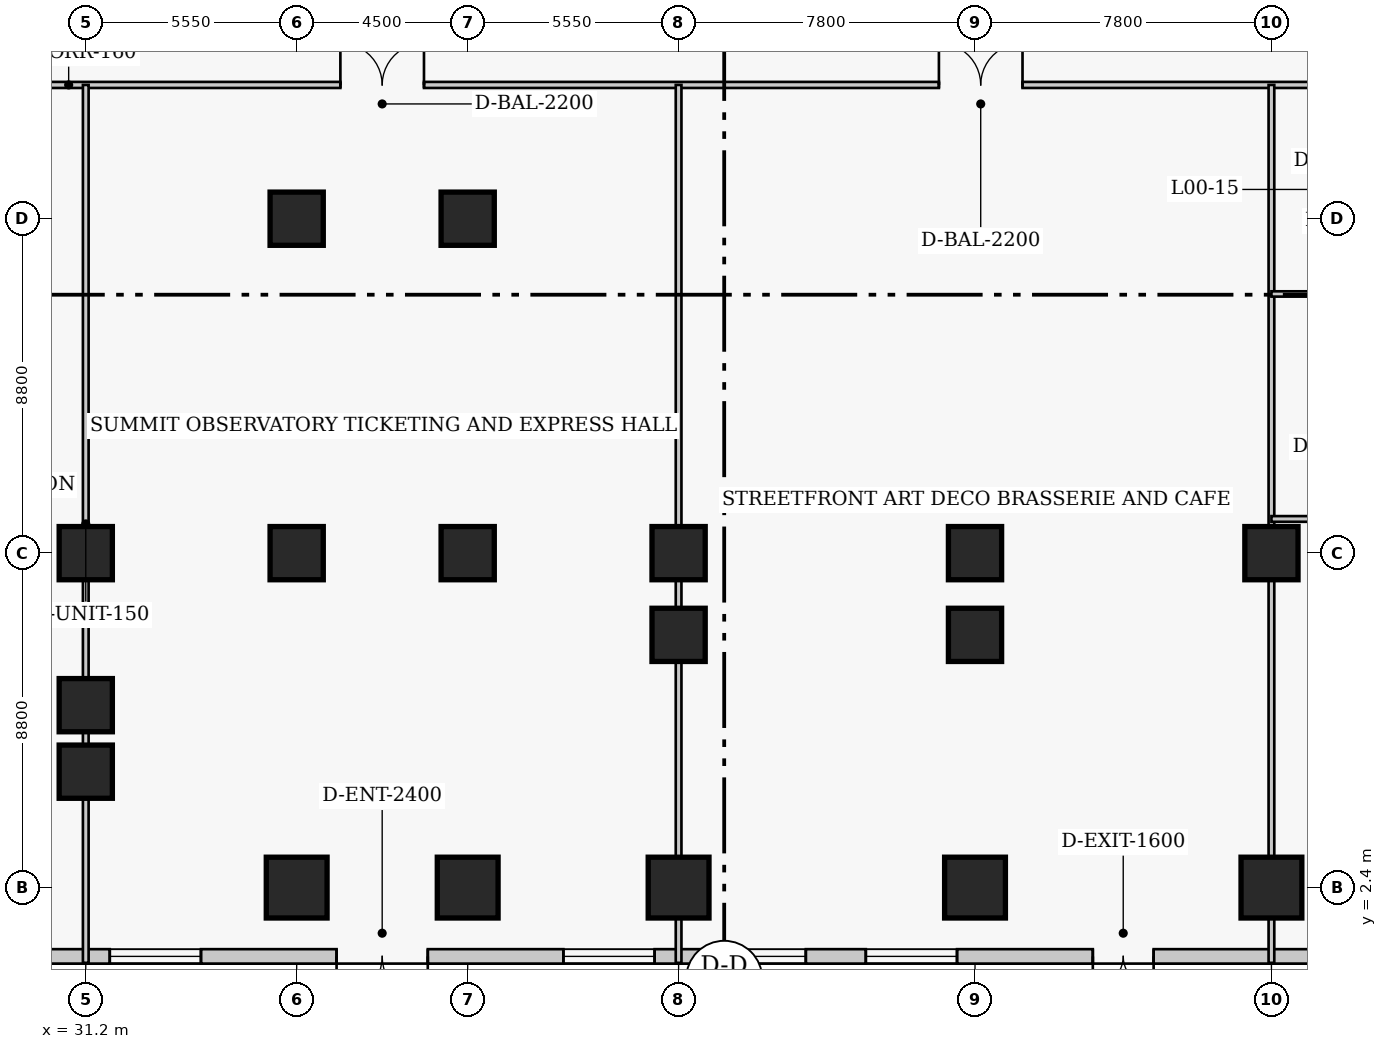
"""IFC4 building model, lengths in metres.
Left out: names, types, materials, properties, quantities, classifications, styles, units other than length and angle.
Written with IfcOpenShell. Run it as: python <this file> out.ifc"""

import sys

from ifc_helpers import new_model, si_unit, direction, frame, frame_2d, origin, origin_2d, place, context, subcontext, project, spatial, rectangle, extrude, element, fill, save


model = new_model("IFC4")
c1 = context("Model", 3, precision=1e-05, world=origin(), true_north=direction((0.0, 1.0)))
c2 = subcontext(c1, "Body", "Model", "MODEL_VIEW")
j1 = project(units=[si_unit("LENGTHUNIT", "METRE"), si_unit("PLANEANGLEUNIT", "RADIAN")], contexts=[c1])
p1 = place(None, origin())
s1 = spatial("IfcSite", under=j1, at=p1, CompositionType="ELEMENT")
p2 = place(p1, origin())
s2 = spatial("IfcBuilding", under=s1, at=p2, CompositionType="ELEMENT")
p3 = place(p2, origin())
s3 = spatial("IfcBuildingStorey", under=s2, at=p3, CompositionType="ELEMENT", Elevation=0.0)
p4 = place(p3, frame((31.2, 11.2, 0.0), z_axis=(0.0, 0.0, 1.0), x_axis=(1.0, 0.0, 0.0)))
e1 = element("IfcColumn", 1, at=p4, inside=s3, PredefinedType="COLUMN", context=c2, shape_type="SweptSolid", body=[
    extrude(rectangle(XDim=1.4, YDim=1.4, at=origin_2d()), origin(), (0.0, 0.0, 1.0), 5.4),
])
p5 = place(p3, frame((36.75, 2.4, 0.0), z_axis=(0.0, 0.0, 1.0), x_axis=(1.0, 0.0, 0.0)))
e2 = element("IfcColumn", 2, at=p5, inside=s3, PredefinedType="COLUMN", context=c2, shape_type="SweptSolid", body=[
    extrude(rectangle(XDim=1.6, YDim=1.6, at=origin_2d()), origin(), (0.0, 0.0, 1.0), 5.4),
])
for number, where, z_axis, x_axis in (
    (3, (36.75, 11.2, 0.0), (0.0, 0.0, 1.0), (1.0, 0.0, 0.0)),
    (4, (36.75, 20.0, 0.0), (0.0, 0.0, 1.0), (1.0, 0.0, 0.0)),
):
    element("IfcColumn", number, at=place(p3, frame(where, z_axis=z_axis, x_axis=x_axis)), inside=s3, PredefinedType="COLUMN", context=c2, shape_type="SweptSolid", body=[
        extrude(rectangle(XDim=1.4, YDim=1.4, at=origin_2d()), origin(), (0.0, 0.0, 1.0), 5.4),
    ])
p6 = place(p3, frame((41.25, 2.4, 0.0), z_axis=(0.0, 0.0, 1.0), x_axis=(1.0, 0.0, 0.0)))
e5 = element("IfcColumn", 5, at=p6, inside=s3, PredefinedType="COLUMN", context=c2, shape_type="SweptSolid", body=[
    extrude(rectangle(XDim=1.6, YDim=1.6, at=origin_2d()), origin(), (0.0, 0.0, 1.0), 5.4),
])
for number, where, z_axis, x_axis in (
    (6, (41.25, 11.2, 0.0), (0.0, 0.0, 1.0), (1.0, 0.0, 0.0)),
    (7, (41.25, 20.0, 0.0), (0.0, 0.0, 1.0), (1.0, 0.0, 0.0)),
):
    element("IfcColumn", number, at=place(p3, frame(where, z_axis=z_axis, x_axis=x_axis)), inside=s3, PredefinedType="COLUMN", context=c2, shape_type="SweptSolid", body=[
        extrude(rectangle(XDim=1.4, YDim=1.4, at=origin_2d()), origin(), (0.0, 0.0, 1.0), 5.4),
    ])
p7 = place(p3, frame((46.8, 2.4, 0.0), z_axis=(0.0, 0.0, 1.0), x_axis=(1.0, 0.0, 0.0)))
e8 = element("IfcColumn", 8, at=p7, inside=s3, PredefinedType="COLUMN", context=c2, shape_type="SweptSolid", body=[
    extrude(rectangle(XDim=1.6, YDim=1.6, at=origin_2d()), origin(), (0.0, 0.0, 1.0), 5.4),
])
p8 = place(p3, frame((46.8, 11.2, 0.0), z_axis=(0.0, 0.0, 1.0), x_axis=(1.0, 0.0, 0.0)))
e9 = element("IfcColumn", 9, at=p8, inside=s3, PredefinedType="COLUMN", context=c2, shape_type="SweptSolid", body=[
    extrude(rectangle(XDim=1.4, YDim=1.4, at=origin_2d()), origin(), (0.0, 0.0, 1.0), 5.4),
])
p9 = place(p3, frame((54.6, 2.4, 0.0), z_axis=(0.0, 0.0, 1.0), x_axis=(1.0, 0.0, 0.0)))
e10 = element("IfcColumn", 10, at=p9, inside=s3, PredefinedType="COLUMN", context=c2, shape_type="SweptSolid", body=[
    extrude(rectangle(XDim=1.6, YDim=1.6, at=origin_2d()), origin(), (0.0, 0.0, 1.0), 5.4),
])
p10 = place(p3, frame((54.6, 11.2, 0.0), z_axis=(0.0, 0.0, 1.0), x_axis=(1.0, 0.0, 0.0)))
e11 = element("IfcColumn", 11, at=p10, inside=s3, PredefinedType="COLUMN", context=c2, shape_type="SweptSolid", body=[
    extrude(rectangle(XDim=1.4, YDim=1.4, at=origin_2d()), origin(), (0.0, 0.0, 1.0), 5.4),
])
p11 = place(p3, frame((62.4, 2.4, 0.0), z_axis=(0.0, 0.0, 1.0), x_axis=(1.0, 0.0, 0.0)))
e12 = element("IfcColumn", 12, at=p11, inside=s3, PredefinedType="COLUMN", context=c2, shape_type="SweptSolid", body=[
    extrude(rectangle(XDim=1.6, YDim=1.6, at=origin_2d()), origin(), (0.0, 0.0, 1.0), 5.4),
])
for number, where, z_axis, x_axis in (
    (13, (62.4, 11.2, 0.0), (0.0, 0.0, 1.0), (1.0, 0.0, 0.0)),
    (14, (31.2, 7.2, 0.0), (0.0, 0.0, 1.0), (1.0, 0.0, 0.0)),
    (15, (31.2, 5.45, 0.0), (0.0, 0.0, 1.0), (1.0, 0.0, 0.0)),
    (16, (46.8, 9.05, 0.0), (0.0, 0.0, 1.0), (1.0, 0.0, 0.0)),
    (17, (54.6, 9.05, 0.0), (0.0, 0.0, 1.0), (1.0, 0.0, 0.0)),
):
    element("IfcColumn", number, at=place(p3, frame(where, z_axis=z_axis, x_axis=x_axis)), inside=s3, PredefinedType="COLUMN", context=c2, shape_type="SweptSolid", body=[
        extrude(rectangle(XDim=1.4, YDim=1.4, at=origin_2d()), origin(), (0.0, 0.0, 1.0), 5.4),
    ])
p12 = place(p3, frame((78.79, 0.59, 0.0), z_axis=(0.0, 0.0, 1.0), x_axis=(-1.0, 0.0, 0.0)))
e18 = element("IfcWall", 18, at=p12, inside=s3, PredefinedType="SOLIDWALL", context=c2, shape_type="SweptSolid", body=[
    extrude(rectangle(XDim=79.58, YDim=0.38, at=frame_2d((39.79, 0.0))), origin(), (0.0, 0.0, 1.0), 5.1),
])
p13 = place(p12, frame((68.44, 0.0, 0.0)))
e19 = element("IfcOpeningElement", 19, at=p13, cuts=e18, PredefinedType="OPENING", context=c2, shape_type="SweptSolid", body=[
    extrude(rectangle(XDim=1.6, YDim=2.2, at=frame_2d((0.8, 1.1))), frame((0.0, 0.2, 0.0), z_axis=(0.0, -1.0, 0.0), x_axis=(1.0, 0.0, 0.0)), (0.0, 0.0, 1.0), 0.4),
])
p14 = place(p12, frame((56.79, 0.0, 0.0)))
e20 = element("IfcOpeningElement", 20, at=p14, cuts=e18, PredefinedType="OPENING", context=c2, shape_type="SweptSolid", body=[
    extrude(rectangle(XDim=2.4, YDim=2.55, at=frame_2d((1.2, 1.275))), frame((0.0, 0.2, 0.0), z_axis=(0.0, -1.0, 0.0), x_axis=(1.0, 0.0, 0.0)), (0.0, 0.0, 1.0), 0.4),
])
p15 = place(p12, frame((38.59, 0.0, 0.0)))
e21 = element("IfcOpeningElement", 21, at=p15, cuts=e18, PredefinedType="OPENING", context=c2, shape_type="SweptSolid", body=[
    extrude(rectangle(XDim=2.4, YDim=2.55, at=frame_2d((1.2, 1.275))), frame((0.0, 0.2, 0.0), z_axis=(0.0, -1.0, 0.0), x_axis=(1.0, 0.0, 0.0)), (0.0, 0.0, 1.0), 0.4),
])
p16 = place(p12, frame((19.49, 0.0, 0.0)))
e22 = element("IfcOpeningElement", 22, at=p16, cuts=e18, PredefinedType="OPENING", context=c2, shape_type="SweptSolid", body=[
    extrude(rectangle(XDim=1.6, YDim=2.2, at=frame_2d((0.8, 1.1))), frame((0.0, 0.2, 0.0), z_axis=(0.0, -1.0, 0.0), x_axis=(1.0, 0.0, 0.0)), (0.0, 0.0, 1.0), 0.4),
])
p17 = place(p12, frame((1.439, 0.0, 0.75)))
e23 = element("IfcOpeningElement", 23, at=p17, cuts=e18, PredefinedType="OPENING", context=c2, shape_type="SweptSolid", body=[
    extrude(rectangle(XDim=2.4, YDim=2.2, at=frame_2d((1.2, 1.1))), frame((0.0, 0.2, 0.0), z_axis=(0.0, -1.0, 0.0), x_axis=(1.0, 0.0, 0.0)), (0.0, 0.0, 1.0), 0.4),
])
p18 = place(p12, frame((4.769, 0.0, 0.75)))
e24 = element("IfcOpeningElement", 24, at=p18, cuts=e18, PredefinedType="OPENING", context=c2, shape_type="SweptSolid", body=[
    extrude(rectangle(XDim=2.4, YDim=2.2, at=frame_2d((1.2, 1.1))), frame((0.0, 0.2, 0.0), z_axis=(0.0, -1.0, 0.0), x_axis=(1.0, 0.0, 0.0)), (0.0, 0.0, 1.0), 0.4),
])
p19 = place(p12, frame((8.748, 0.0, 0.75)))
e25 = element("IfcOpeningElement", 25, at=p19, cuts=e18, PredefinedType="OPENING", context=c2, shape_type="SweptSolid", body=[
    extrude(rectangle(XDim=2.4, YDim=2.2, at=frame_2d((1.2, 1.1))), frame((0.0, 0.2, 0.0), z_axis=(0.0, -1.0, 0.0), x_axis=(1.0, 0.0, 0.0)), (0.0, 0.0, 1.0), 0.4),
])
p20 = place(p12, frame((12.727, 0.0, 0.75)))
e26 = element("IfcOpeningElement", 26, at=p20, cuts=e18, PredefinedType="OPENING", context=c2, shape_type="SweptSolid", body=[
    extrude(rectangle(XDim=2.4, YDim=2.2, at=frame_2d((1.2, 1.1))), frame((0.0, 0.2, 0.0), z_axis=(0.0, -1.0, 0.0), x_axis=(1.0, 0.0, 0.0)), (0.0, 0.0, 1.0), 0.4),
])
p21 = place(p12, frame((24.664, 0.0, 0.75)))
e27 = element("IfcOpeningElement", 27, at=p21, cuts=e18, PredefinedType="OPENING", context=c2, shape_type="SweptSolid", body=[
    extrude(rectangle(XDim=2.4, YDim=2.2, at=frame_2d((1.2, 1.1))), frame((0.0, 0.2, 0.0), z_axis=(0.0, -1.0, 0.0), x_axis=(1.0, 0.0, 0.0)), (0.0, 0.0, 1.0), 0.4),
])
p22 = place(p12, frame((28.643, 0.0, 0.75)))
e28 = element("IfcOpeningElement", 28, at=p22, cuts=e18, PredefinedType="OPENING", context=c2, shape_type="SweptSolid", body=[
    extrude(rectangle(XDim=2.4, YDim=2.2, at=frame_2d((1.2, 1.1))), frame((0.0, 0.2, 0.0), z_axis=(0.0, -1.0, 0.0), x_axis=(1.0, 0.0, 0.0)), (0.0, 0.0, 1.0), 0.4),
])
p23 = place(p12, frame((32.622, 0.0, 0.75)))
e29 = element("IfcOpeningElement", 29, at=p23, cuts=e18, PredefinedType="OPENING", context=c2, shape_type="SweptSolid", body=[
    extrude(rectangle(XDim=2.4, YDim=2.2, at=frame_2d((1.2, 1.1))), frame((0.0, 0.2, 0.0), z_axis=(0.0, -1.0, 0.0), x_axis=(1.0, 0.0, 0.0)), (0.0, 0.0, 1.0), 0.4),
])
p24 = place(p12, frame((44.559, 0.0, 0.75)))
e30 = element("IfcOpeningElement", 30, at=p24, cuts=e18, PredefinedType="OPENING", context=c2, shape_type="SweptSolid", body=[
    extrude(rectangle(XDim=2.4, YDim=2.2, at=frame_2d((1.2, 1.1))), frame((0.0, 0.2, 0.0), z_axis=(0.0, -1.0, 0.0), x_axis=(1.0, 0.0, 0.0)), (0.0, 0.0, 1.0), 0.4),
])
p25 = place(p12, frame((48.538, 0.0, 0.75)))
e31 = element("IfcOpeningElement", 31, at=p25, cuts=e18, PredefinedType="OPENING", context=c2, shape_type="SweptSolid", body=[
    extrude(rectangle(XDim=2.4, YDim=2.2, at=frame_2d((1.2, 1.1))), frame((0.0, 0.2, 0.0), z_axis=(0.0, -1.0, 0.0), x_axis=(1.0, 0.0, 0.0)), (0.0, 0.0, 1.0), 0.4),
])
p26 = place(p12, frame((52.517, 0.0, 0.75)))
e32 = element("IfcOpeningElement", 32, at=p26, cuts=e18, PredefinedType="OPENING", context=c2, shape_type="SweptSolid", body=[
    extrude(rectangle(XDim=2.4, YDim=2.2, at=frame_2d((1.2, 1.1))), frame((0.0, 0.2, 0.0), z_axis=(0.0, -1.0, 0.0), x_axis=(1.0, 0.0, 0.0)), (0.0, 0.0, 1.0), 0.4),
])
p27 = place(p12, frame((60.475, 0.0, 0.75)))
e33 = element("IfcOpeningElement", 33, at=p27, cuts=e18, PredefinedType="OPENING", context=c2, shape_type="SweptSolid", body=[
    extrude(rectangle(XDim=2.4, YDim=2.2, at=frame_2d((1.2, 1.1))), frame((0.0, 0.2, 0.0), z_axis=(0.0, -1.0, 0.0), x_axis=(1.0, 0.0, 0.0)), (0.0, 0.0, 1.0), 0.4),
])
p28 = place(p12, frame((72.412, 0.0, 0.75)))
e34 = element("IfcOpeningElement", 34, at=p28, cuts=e18, PredefinedType="OPENING", context=c2, shape_type="SweptSolid", body=[
    extrude(rectangle(XDim=2.4, YDim=2.2, at=frame_2d((1.2, 1.1))), frame((0.0, 0.2, 0.0), z_axis=(0.0, -1.0, 0.0), x_axis=(1.0, 0.0, 0.0)), (0.0, 0.0, 1.0), 0.4),
])
p29 = place(p12, frame((75.74, 0.0, 0.75)))
e35 = element("IfcOpeningElement", 35, at=p29, cuts=e18, PredefinedType="OPENING", context=c2, shape_type="SweptSolid", body=[
    extrude(rectangle(XDim=2.4, YDim=2.2, at=frame_2d((1.2, 1.1))), frame((0.0, 0.2, 0.0), z_axis=(0.0, -1.0, 0.0), x_axis=(1.0, 0.0, 0.0)), (0.0, 0.0, 1.0), 0.4),
])
p30 = place(p3, frame((-2.98, 23.52, 0.0), z_axis=(0.0, 0.0, 1.0), x_axis=(1.0, 0.0, 0.0)))
e36 = element("IfcWall", 36, at=p30, inside=s3, PredefinedType="PARTITIONING", context=c2, shape_type="SweptSolid", body=[
    extrude(rectangle(XDim=83.96, YDim=0.16, at=frame_2d((41.98, 0.0))), origin(), (0.0, 0.0, 1.0), 5.1),
])
p31 = place(p30, frame((11.96, 0.0, 0.0)))
e37 = element("IfcOpeningElement", 37, at=p31, cuts=e36, PredefinedType="OPENING", context=c2, shape_type="SweptSolid", body=[
    extrude(rectangle(XDim=1.1, YDim=2.15, at=frame_2d((0.55, 1.075))), frame((0.0, 0.09, 0.0), z_axis=(0.0, -1.0, 0.0), x_axis=(1.0, 0.0, 0.0)), (0.0, 0.0, 1.0), 0.18),
])
p32 = place(p30, frame((6.73, 0.0, 0.0)))
e38 = element("IfcOpeningElement", 38, at=p32, cuts=e36, PredefinedType="OPENING", context=c2, shape_type="SweptSolid", body=[
    extrude(rectangle(XDim=1.8, YDim=2.2, at=frame_2d((0.9, 1.1))), frame((0.0, 0.09, 0.0), z_axis=(0.0, -1.0, 0.0), x_axis=(1.0, 0.0, 0.0)), (0.0, 0.0, 1.0), 0.18),
])
p33 = place(p30, frame((24.38, 0.0, 0.0)))
e39 = element("IfcOpeningElement", 39, at=p33, cuts=e36, PredefinedType="OPENING", context=c2, shape_type="SweptSolid", body=[
    extrude(rectangle(XDim=2.2, YDim=2.4, at=frame_2d((1.1, 1.2))), frame((0.0, 0.09, 0.0), z_axis=(0.0, -1.0, 0.0), x_axis=(1.0, 0.0, 0.0)), (0.0, 0.0, 1.0), 0.18),
])
p34 = place(p30, frame((40.88, 0.0, 0.0)))
e40 = element("IfcOpeningElement", 40, at=p34, cuts=e36, PredefinedType="OPENING", context=c2, shape_type="SweptSolid", body=[
    extrude(rectangle(XDim=2.2, YDim=2.4, at=frame_2d((1.1, 1.2))), frame((0.0, 0.09, 0.0), z_axis=(0.0, -1.0, 0.0), x_axis=(1.0, 0.0, 0.0)), (0.0, 0.0, 1.0), 0.18),
])
p35 = place(p30, frame((56.63, 0.0, 0.0)))
e41 = element("IfcOpeningElement", 41, at=p35, cuts=e36, PredefinedType="OPENING", context=c2, shape_type="SweptSolid", body=[
    extrude(rectangle(XDim=2.2, YDim=2.4, at=frame_2d((1.1, 1.2))), frame((0.0, 0.09, 0.0), z_axis=(0.0, -1.0, 0.0), x_axis=(1.0, 0.0, 0.0)), (0.0, 0.0, 1.0), 0.18),
])
p36 = place(p30, frame((67.14, 0.0, 0.0)))
e42 = element("IfcOpeningElement", 42, at=p36, cuts=e36, PredefinedType="OPENING", context=c2, shape_type="SweptSolid", body=[
    extrude(rectangle(XDim=0.88, YDim=2.05, at=frame_2d((0.44, 1.025))), frame((0.0, 0.09, 0.0), z_axis=(0.0, -1.0, 0.0), x_axis=(1.0, 0.0, 0.0)), (0.0, 0.0, 1.0), 0.18),
])
p37 = place(p30, frame((73.29, 0.0, 0.0)))
e43 = element("IfcOpeningElement", 43, at=p37, cuts=e36, PredefinedType="OPENING", context=c2, shape_type="SweptSolid", body=[
    extrude(rectangle(XDim=0.88, YDim=2.05, at=frame_2d((0.44, 1.025))), frame((0.0, 0.09, 0.0), z_axis=(0.0, -1.0, 0.0), x_axis=(1.0, 0.0, 0.0)), (0.0, 0.0, 1.0), 0.18),
])
for number, where, z_axis, x_axis in (
    (44, (31.2, 0.42, 0.0), (0.0, 0.0, 1.0), (0.0, 1.0, 0.0)),
    (45, (46.8, 0.42, 0.0), (0.0, 0.0, 1.0), (0.0, 1.0, 0.0)),
):
    element("IfcWall", number, at=place(p3, frame(where, z_axis=z_axis, x_axis=x_axis)), inside=s3, PredefinedType="PARTITIONING", context=c2, shape_type="SweptSolid", body=[
        extrude(rectangle(XDim=23.1, YDim=0.15, at=frame_2d((11.55, 0.0))), origin(), (0.0, 0.0, 1.0), 4.06),
    ])
p38 = place(p3, frame((62.4, 0.42, 0.0), z_axis=(0.0, 0.0, 1.0), x_axis=(0.0, 1.0, 0.0)))
e46 = element("IfcWall", 46, at=p38, inside=s3, PredefinedType="PARTITIONING", context=c2, shape_type="SweptSolid", body=[
    extrude(rectangle(XDim=23.1, YDim=0.15, at=frame_2d((11.55, 0.0))), origin(), (0.0, 0.0, 1.0), 4.35),
])
p39 = place(p3, frame((62.4, 18.02, 0.0), z_axis=(0.0, 0.0, 1.0), x_axis=(1.0, 0.0, 0.0)))
e47 = element("IfcWall", 47, at=p39, inside=s3, PredefinedType="PLUMBINGWALL", context=c2, shape_type="SweptSolid", body=[
    extrude(rectangle(XDim=18.58, YDim=0.14, at=frame_2d((9.29, 0.0))), origin(), (0.0, 0.0, 1.0), 5.1),
])
p40 = place(p39, frame((2.06, 0.0, 0.0)))
e48 = element("IfcOpeningElement", 48, at=p40, cuts=e47, PredefinedType="OPENING", context=c2, shape_type="SweptSolid", body=[
    extrude(rectangle(XDim=0.88, YDim=2.05, at=frame_2d((0.44, 1.025))), frame((0.0, 0.08, 0.0), z_axis=(0.0, -1.0, 0.0), x_axis=(1.0, 0.0, 0.0)), (0.0, 0.0, 1.0), 0.16),
])
p41 = place(p39, frame((9.06, 0.0, 0.0)))
e49 = element("IfcOpeningElement", 49, at=p41, cuts=e47, PredefinedType="OPENING", context=c2, shape_type="SweptSolid", body=[
    extrude(rectangle(XDim=0.88, YDim=2.05, at=frame_2d((0.44, 1.025))), frame((0.0, 0.08, 0.0), z_axis=(0.0, -1.0, 0.0), x_axis=(1.0, 0.0, 0.0)), (0.0, 0.0, 1.0), 0.16),
])
p42 = place(p3, frame((62.4, 12.1, 0.0), z_axis=(0.0, 0.0, 1.0), x_axis=(1.0, 0.0, 0.0)))
e50 = element("IfcWall", 50, at=p42, inside=s3, PredefinedType="PARTITIONING", context=c2, shape_type="SweptSolid", body=[
    extrude(rectangle(XDim=18.58, YDim=0.15, at=frame_2d((9.29, 0.0))), origin(), (0.0, 0.0, 1.0), 5.1),
])
p43 = place(p42, frame((2.0, 0.0, 0.0)))
e51 = element("IfcOpeningElement", 51, at=p43, cuts=e50, PredefinedType="OPENING", context=c2, shape_type="SweptSolid", body=[
    extrude(rectangle(XDim=1.0, YDim=2.15, at=frame_2d((0.5, 1.075))), frame((0.0, 0.085, 0.0), z_axis=(0.0, -1.0, 0.0), x_axis=(1.0, 0.0, 0.0)), (0.0, 0.0, 1.0), 0.17),
])
p44 = place(p15, origin())
e52 = element("IfcDoor", 52, at=p44, inside=s3, OperationType="DOUBLE_DOOR_SINGLE_SWING", PredefinedType="DOOR", context=c2, shape_type="SweptSolid", body=[
    extrude(rectangle(XDim=2.4, YDim=2.55, at=frame_2d((1.2, 1.275))), frame((0.0, 0.025, 0.0), z_axis=(0.0, -1.0, 0.0), x_axis=(1.0, 0.0, 0.0)), (0.0, 0.0, 1.0), 0.05),
])
fill(e21, e52)
p45 = place(p16, origin())
e53 = element("IfcDoor", 53, at=p45, inside=s3, OperationType="DOUBLE_DOOR_SINGLE_SWING", PredefinedType="DOOR", context=c2, shape_type="SweptSolid", body=[
    extrude(rectangle(XDim=1.6, YDim=2.2, at=frame_2d((0.8, 1.1))), frame((0.0, 0.025, 0.0), z_axis=(0.0, -1.0, 0.0), x_axis=(1.0, 0.0, 0.0)), (0.0, 0.0, 1.0), 0.05),
])
fill(e22, e53)
p46 = place(p21, origin())
e54 = element("IfcWindow", 54, at=p46, inside=s3, PartitioningType="SINGLE_PANEL", PredefinedType="WINDOW", context=c2, shape_type="SweptSolid", body=[
    extrude(rectangle(XDim=2.4, YDim=2.2, at=frame_2d((1.2, 1.1))), frame((0.0, 0.03, 0.0), z_axis=(0.0, -1.0, 0.0), x_axis=(1.0, 0.0, 0.0)), (0.0, 0.0, 1.0), 0.06),
])
fill(e27, e54)
p47 = place(p22, origin())
e55 = element("IfcWindow", 55, at=p47, inside=s3, PartitioningType="SINGLE_PANEL", PredefinedType="WINDOW", context=c2, shape_type="SweptSolid", body=[
    extrude(rectangle(XDim=2.4, YDim=2.2, at=frame_2d((1.2, 1.1))), frame((0.0, 0.03, 0.0), z_axis=(0.0, -1.0, 0.0), x_axis=(1.0, 0.0, 0.0)), (0.0, 0.0, 1.0), 0.06),
])
fill(e28, e55)
p48 = place(p23, origin())
e56 = element("IfcWindow", 56, at=p48, inside=s3, PartitioningType="SINGLE_PANEL", PredefinedType="WINDOW", context=c2, shape_type="SweptSolid", body=[
    extrude(rectangle(XDim=2.4, YDim=2.2, at=frame_2d((1.2, 1.1))), frame((0.0, 0.03, 0.0), z_axis=(0.0, -1.0, 0.0), x_axis=(1.0, 0.0, 0.0)), (0.0, 0.0, 1.0), 0.06),
])
fill(e29, e56)
p49 = place(p24, origin())
e57 = element("IfcWindow", 57, at=p49, inside=s3, PartitioningType="SINGLE_PANEL", PredefinedType="WINDOW", context=c2, shape_type="SweptSolid", body=[
    extrude(rectangle(XDim=2.4, YDim=2.2, at=frame_2d((1.2, 1.1))), frame((0.0, 0.03, 0.0), z_axis=(0.0, -1.0, 0.0), x_axis=(1.0, 0.0, 0.0)), (0.0, 0.0, 1.0), 0.06),
])
fill(e30, e57)
p50 = place(p34, origin())
e58 = element("IfcDoor", 58, at=p50, inside=s3, OperationType="DOUBLE_DOOR_SINGLE_SWING", PredefinedType="DOOR", context=c2, shape_type="SweptSolid", body=[
    extrude(rectangle(XDim=2.2, YDim=2.4, at=frame_2d((1.1, 1.2))), frame((0.0, 0.025, 0.0), z_axis=(0.0, -1.0, 0.0), x_axis=(1.0, 0.0, 0.0)), (0.0, 0.0, 1.0), 0.05),
])
fill(e40, e58)
p51 = place(p35, origin())
e59 = element("IfcDoor", 59, at=p51, inside=s3, OperationType="DOUBLE_DOOR_SINGLE_SWING", PredefinedType="DOOR", context=c2, shape_type="SweptSolid", body=[
    extrude(rectangle(XDim=2.2, YDim=2.4, at=frame_2d((1.1, 1.2))), frame((0.0, 0.025, 0.0), z_axis=(0.0, -1.0, 0.0), x_axis=(1.0, 0.0, 0.0)), (0.0, 0.0, 1.0), 0.05),
])
fill(e41, e59)
save(model, sys.argv[1])
